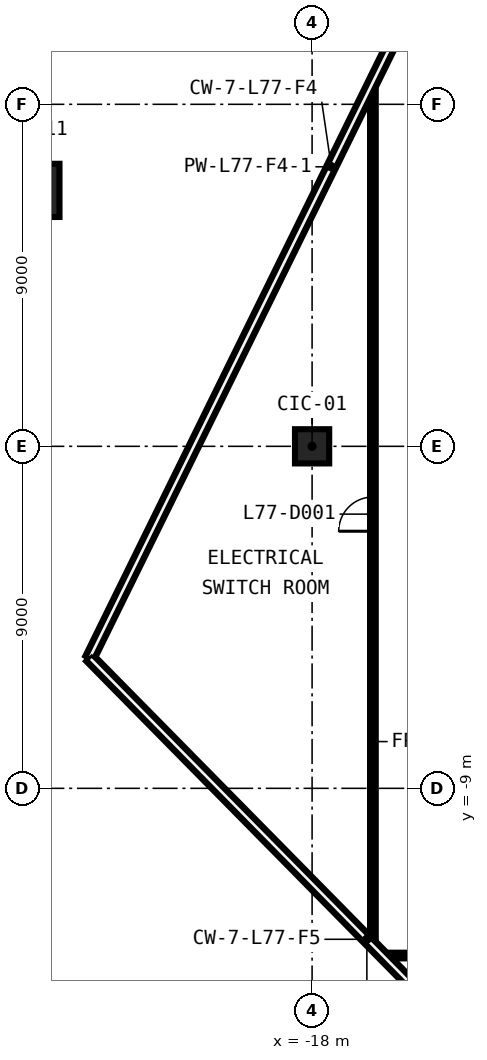
"""IFC4 building model, lengths in metres.
Left out: names, types, materials, properties, quantities, classifications, styles, units other than length and angle.
Written with IfcOpenShell. Run it as: python <this file> out.ifc"""

import sys

from ifc_helpers import new_model, si_unit, direction, frame, frame_2d, origin, origin_2d, place, context, subcontext, project, spatial, rectangle, hollow_rectangle, extrude, element, fill, save


model = new_model("IFC4")
c1 = context("Model", 3, precision=1e-05, world=origin(), true_north=direction((0.0, 1.0)))
c2 = subcontext(c1, "Body", "Model", "MODEL_VIEW")
j1 = project(units=[si_unit("LENGTHUNIT", "METRE"), si_unit("PLANEANGLEUNIT", "RADIAN")], contexts=[c1])
p1 = place(None, origin())
s1 = spatial("IfcSite", under=j1, at=p1, CompositionType="ELEMENT")
p2 = place(p1, origin())
s2 = spatial("IfcBuilding", under=s1, at=p2, CompositionType="ELEMENT")
p3 = place(p2, frame((0.0, 0.0, 359.0)))
s3 = spatial("IfcBuildingStorey", under=s2, at=p3, CompositionType="ELEMENT", Elevation=359.0)
p4 = place(p3, frame((-18.0, 0.0, 0.0), z_axis=(0.0, 0.0, 1.0), x_axis=(1.0, 0.0, 0.0)))
e1 = element("IfcColumn", 1, at=p4, inside=s3, PredefinedType="COLUMN", context=c2, shape_type="SweptSolid", body=[
    extrude(rectangle(XDim=0.9, YDim=0.9, at=origin_2d()), origin(), (0.0, 0.0, 1.0), 3.8),
])
p5 = place(p3, frame((-25.347, 6.735, 0.0), z_axis=(0.0, 0.0, 1.0), x_axis=(1.0, 0.0, 0.0)))
e2 = element("IfcColumn", 2, at=p5, inside=s3, PredefinedType="COLUMN", context=c2, shape_type="SweptSolid", body=[
    extrude(hollow_rectangle(XDim=1.4, YDim=1.4, WallThickness=0.06, at=origin_2d()), origin(), (0.0, 0.0, 1.0), 4.2),
])
p6 = place(p3, frame((14.656, -13.4, 0.0), z_axis=(0.0, 0.0, 1.0), x_axis=(-1.0, 0.0, 0.0)))
e3 = element("IfcWall", 3, at=p6, inside=s3, PredefinedType="PARTITIONING", context=c2, shape_type="SweptSolid", body=[
    extrude(rectangle(XDim=30.765, YDim=0.15, at=frame_2d((15.383, 0.0))), origin(), (0.0, 0.0, 1.0), 3.8),
])
p7 = place(p6, frame((14.933, 0.0, 0.0)))
e4 = element("IfcOpeningElement", 4, at=p7, cuts=e3, PredefinedType="OPENING", context=c2, shape_type="SweptSolid", body=[
    extrude(rectangle(XDim=0.9, YDim=2.1, at=frame_2d((0.45, 1.05))), frame((0.0, 0.085, 0.0), z_axis=(0.0, -1.0, 0.0), x_axis=(1.0, 0.0, 0.0)), (0.0, 0.0, 1.0), 0.17),
])
p8 = place(p3, frame((-16.4, -13.105, 0.0), z_axis=(0.0, 0.0, 1.0), x_axis=(0.0, 1.0, 0.0)))
e5 = element("IfcWall", 5, at=p8, inside=s3, PredefinedType="PARTITIONING", context=c2, shape_type="SweptSolid", body=[
    extrude(rectangle(XDim=22.641, YDim=0.15, at=frame_2d((11.321, 0.0))), origin(), (0.0, 0.0, 1.0), 3.8),
])
p9 = place(p8, frame((10.871, 0.0, 0.0)))
e6 = element("IfcOpeningElement", 6, at=p9, cuts=e5, PredefinedType="OPENING", context=c2, shape_type="SweptSolid", body=[
    extrude(rectangle(XDim=0.9, YDim=2.1, at=frame_2d((0.45, 1.05))), frame((0.0, 0.085, 0.0), z_axis=(0.0, -1.0, 0.0), x_axis=(1.0, 0.0, 0.0)), (0.0, 0.0, 1.0), 0.17),
])
p10 = place(p3, frame((-11.138, 20.28, 0.0), z_axis=(0.0, 0.0, 1.0), x_axis=(-0.441342255748, -0.897338850876, 0.0)))
e7 = element("IfcWall", 7, at=p10, inside=s3, PredefinedType="SOLIDWALL", context=c2, shape_type="SweptSolid", body=[
    extrude(rectangle(XDim=28.805, YDim=0.25, at=frame_2d((14.403, 0.0))), origin(), (0.0, 0.0, 1.0), 3.8),
])
p11 = place(p3, frame((-23.851, -5.568, 0.0), z_axis=(0.0, 0.0, 1.0), x_axis=(0.701718568407, -0.712454244673, 0.0)))
e8 = element("IfcWall", 8, at=p11, inside=s3, PredefinedType="SOLIDWALL", context=c2, shape_type="SweptSolid", body=[
    extrude(rectangle(XDim=20.785, YDim=0.25, at=frame_2d((10.393, 0.0))), origin(), (0.0, 0.0, 1.0), 3.8),
])
p12 = place(p9, origin())
e9 = element("IfcDoor", 9, at=p12, inside=s3, OperationType="SINGLE_SWING_RIGHT", PredefinedType="DOOR", context=c2, shape_type="SweptSolid", body=[
    extrude(rectangle(XDim=0.9, YDim=2.1, at=frame_2d((0.45, 1.05))), frame((0.0, 0.025, 0.0), z_axis=(0.0, -1.0, 0.0), x_axis=(1.0, 0.0, 0.0)), (0.0, 0.0, 1.0), 0.05),
])
fill(e6, e9)
save(model, sys.argv[1])
